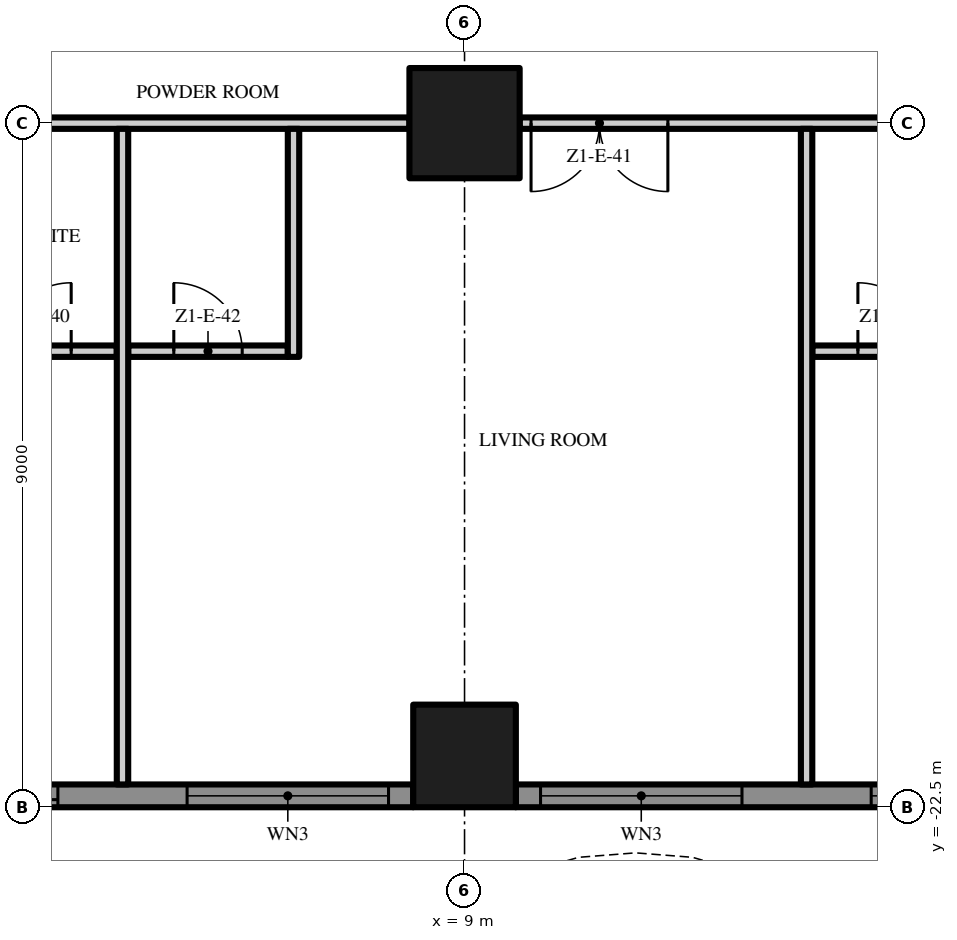
"""IFC4 building model, lengths in metres.
Left out: names, types, materials, properties, quantities, classifications, styles, units other than length and angle.
Written with IfcOpenShell. Run it as: python <this file> out.ifc"""

import sys

from ifc_helpers import new_model, si_unit, direction, frame, frame_2d, origin, origin_2d, place, context, subcontext, project, spatial, polyline, rectangle, outline, extrude, element, fill, save


model = new_model("IFC4")
c1 = context("Model", 3, precision=1e-05, world=origin(), true_north=direction((0.0, 1.0)))
c2 = subcontext(c1, "Body", "Model", "MODEL_VIEW")
j1 = project(units=[si_unit("LENGTHUNIT", "METRE"), si_unit("PLANEANGLEUNIT", "RADIAN")], contexts=[c1])
p1 = place(None, origin())
s1 = spatial("IfcSite", under=j1, at=p1, CompositionType="ELEMENT")
p2 = place(p1, origin())
s2 = spatial("IfcBuilding", under=s1, at=p2, CompositionType="ELEMENT")
p3 = place(p2, frame((0.0, 0.0, 60.6)))
s3 = spatial("IfcBuildingStorey", under=s2, at=p3, CompositionType="ELEMENT", Elevation=60.6)
p4 = place(p3, frame((9.0, -13.5, 0.0), z_axis=(0.0, 0.0, 1.0), x_axis=(1.0, 0.0, 0.0)))
e1 = element("IfcColumn", 1, at=p4, inside=s3, PredefinedType="COLUMN", context=c2, shape_type="SweptSolid", body=[
    extrude(rectangle(XDim=1.45, YDim=1.45, at=origin_2d()), origin(), (0.0, 0.0, 1.0), 3.5),
])
p5 = place(p3, frame((9.0, -21.825, 0.0), z_axis=(0.0, 0.0, 1.0), x_axis=(1.0, 0.0, 0.0)))
e2 = element("IfcColumn", 2, at=p5, inside=s3, PredefinedType="COLUMN", context=c2, shape_type="SweptSolid", body=[
    extrude(rectangle(XDim=1.35, YDim=1.35, at=origin_2d()), origin(), (0.0, 0.0, 1.0), 3.5),
])
p6 = place(p3, frame((8.325, -22.35, 0.0), z_axis=(0.0, 0.0, 1.0), x_axis=(-1.0, 0.0, 0.0)))
e3 = element("IfcWall", 3, at=p6, inside=s3, PredefinedType="SOLIDWALL", context=c2, shape_type="SweptSolid", body=[
    extrude(rectangle(XDim=7.65, YDim=0.3, at=frame_2d((3.825, 0.0))), origin(), (0.0, 0.0, 1.0), 3.5),
])
p7 = place(p6, frame((4.675, 0.0, 0.0)))
e4 = element("IfcOpeningElement", 4, at=p7, cuts=e3, PredefinedType="OPENING", context=c2, shape_type="SweptSolid", body=[
    extrude(rectangle(XDim=2.65, YDim=2.4, at=frame_2d((1.325, 1.2))), frame((0.0, 0.16, 0.0), z_axis=(0.0, -1.0, 0.0), x_axis=(1.0, 0.0, 0.0)), (0.0, 0.0, 1.0), 0.32),
])
p8 = place(p6, frame((0.325, 0.0, 0.45)))
e5 = element("IfcOpeningElement", 5, at=p8, cuts=e3, PredefinedType="OPENING", context=c2, shape_type="SweptSolid", body=[
    extrude(rectangle(XDim=2.65, YDim=2.65, at=frame_2d((1.325, 1.325))), frame((0.0, 0.16, 0.0), z_axis=(0.0, -1.0, 0.0), x_axis=(1.0, 0.0, 0.0)), (0.0, 0.0, 1.0), 0.32),
])
p9 = place(p3, frame((17.325, -22.35, 0.0), z_axis=(0.0, 0.0, 1.0), x_axis=(-1.0, 0.0, 0.0)))
e6 = element("IfcWall", 6, at=p9, inside=s3, PredefinedType="SOLIDWALL", context=c2, shape_type="SweptSolid", body=[
    extrude(rectangle(XDim=7.65, YDim=0.3, at=frame_2d((3.825, 0.0))), origin(), (0.0, 0.0, 1.0), 3.5),
])
p10 = place(p9, frame((4.675, 0.0, 0.45)))
e7 = element("IfcOpeningElement", 7, at=p10, cuts=e6, PredefinedType="OPENING", context=c2, shape_type="SweptSolid", body=[
    extrude(rectangle(XDim=2.65, YDim=2.65, at=frame_2d((1.325, 1.325))), frame((0.0, 0.16, 0.0), z_axis=(0.0, -1.0, 0.0), x_axis=(1.0, 0.0, 0.0)), (0.0, 0.0, 1.0), 0.32),
])
p11 = place(p9, frame((0.325, 0.0, 0.45)))
e8 = element("IfcOpeningElement", 8, at=p11, cuts=e6, PredefinedType="OPENING", context=c2, shape_type="SweptSolid", body=[
    extrude(rectangle(XDim=2.65, YDim=2.65, at=frame_2d((1.325, 1.325))), frame((0.0, 0.16, 0.0), z_axis=(0.0, -1.0, 0.0), x_axis=(1.0, 0.0, 0.0)), (0.0, 0.0, 1.0), 0.32),
])
p12 = place(p3, origin())
e9 = element("IfcWall", 9, at=p12, inside=s3, PredefinedType="USERDEFINED", context=c2, shape_type="SweptSolid", body=[
    extrude(outline(polyline([(-22.5, -24.3), (-21.0, -23.595), (-19.5, -23.159), (-18.75, -23.1), (-18.0, -23.159), (-16.5, -23.595), (-15.0, -24.3), (-13.5, -25.005), (-12.0, -25.441), (-11.25, -25.5), (-10.5, -25.441), (-9.0, -25.005), (-7.5, -24.3), (-6.0, -23.595), (-4.5, -23.159), (-3.75, -23.1), (-3.0, -23.159), (-1.5, -23.595), (0.0, -24.3), (1.5, -25.005), (3.0, -25.441), (3.75, -25.5), (4.5, -25.441), (6.0, -25.005), (7.5, -24.3), (9.0, -23.595), (10.5, -23.159), (11.25, -23.1), (12.0, -23.159), (13.5, -23.595), (15.0, -24.3), (16.5, -25.005), (18.0, -25.441), (18.75, -25.5), (19.5, -25.441), (21.0, -25.005), (22.5, -24.3), (22.394, -24.074), (20.911, -24.771), (19.455, -25.194), (18.75, -25.249), (18.045, -25.194), (16.589, -24.771), (15.106, -24.074), (13.589, -23.36), (12.045, -22.911), (11.25, -22.849), (10.455, -22.911), (8.911, -23.36), (7.394, -24.074), (5.911, -24.771), (4.455, -25.194), (3.75, -25.249), (3.045, -25.194), (1.589, -24.771), (0.106, -24.074), (-1.411, -23.36), (-2.955, -22.911), (-3.75, -22.849), (-4.545, -22.911), (-6.089, -23.36), (-7.606, -24.074), (-9.089, -24.771), (-10.545, -25.194), (-11.25, -25.249), (-11.955, -25.194), (-13.411, -24.771), (-14.894, -24.074), (-16.411, -23.36), (-17.955, -22.911), (-18.75, -22.849), (-19.545, -22.911), (-21.089, -23.36), (-22.606, -24.074), (-22.5, -24.3)])), origin(), (0.0, 0.0, 1.0), 0.9),
])
p13 = place(p3, frame((2.325, -16.5, 0.0), z_axis=(0.0, 0.0, 1.0), x_axis=(1.0, 0.0, 0.0)))
e10 = element("IfcWall", 10, at=p13, inside=s3, PredefinedType="PARTITIONING", context=c2, shape_type="SweptSolid", body=[
    extrude(rectangle(XDim=2.1, YDim=0.15, at=frame_2d((1.05, 0.0))), origin(), (0.0, 0.0, 1.0), 3.5),
])
p14 = place(p13, frame((0.6, 0.0, 0.0)))
e11 = element("IfcOpeningElement", 11, at=p14, cuts=e10, PredefinedType="OPENING", context=c2, shape_type="SweptSolid", body=[
    extrude(rectangle(XDim=0.9, YDim=2.1, at=frame_2d((0.45, 1.05))), frame((0.0, 0.085, 0.0), z_axis=(0.0, -1.0, 0.0), x_axis=(1.0, 0.0, 0.0)), (0.0, 0.0, 1.0), 0.17),
])
p15 = place(p3, frame((4.575, -16.5, 0.0), z_axis=(0.0, 0.0, 1.0), x_axis=(1.0, 0.0, 0.0)))
e12 = element("IfcWall", 12, at=p15, inside=s3, PredefinedType="PARTITIONING", context=c2, shape_type="SweptSolid", body=[
    extrude(rectangle(XDim=2.1, YDim=0.15, at=frame_2d((1.05, 0.0))), origin(), (0.0, 0.0, 1.0), 3.5),
])
p16 = place(p15, frame((0.6, 0.0, 0.0)))
e13 = element("IfcOpeningElement", 13, at=p16, cuts=e12, PredefinedType="OPENING", context=c2, shape_type="SweptSolid", body=[
    extrude(rectangle(XDim=0.9, YDim=2.1, at=frame_2d((0.45, 1.05))), frame((0.0, 0.085, 0.0), z_axis=(0.0, -1.0, 0.0), x_axis=(1.0, 0.0, 0.0)), (0.0, 0.0, 1.0), 0.17),
])
p17 = place(p3, frame((13.575, -16.5, 0.0), z_axis=(0.0, 0.0, 1.0), x_axis=(1.0, 0.0, 0.0)))
e14 = element("IfcWall", 14, at=p17, inside=s3, PredefinedType="PARTITIONING", context=c2, shape_type="SweptSolid", body=[
    extrude(rectangle(XDim=2.1, YDim=0.15, at=frame_2d((1.05, 0.0))), origin(), (0.0, 0.0, 1.0), 3.5),
])
p18 = place(p17, frame((0.6, 0.0, 0.0)))
e15 = element("IfcOpeningElement", 15, at=p18, cuts=e14, PredefinedType="OPENING", context=c2, shape_type="SweptSolid", body=[
    extrude(rectangle(XDim=0.9, YDim=2.1, at=frame_2d((0.45, 1.05))), frame((0.0, 0.085, 0.0), z_axis=(0.0, -1.0, 0.0), x_axis=(1.0, 0.0, 0.0)), (0.0, 0.0, 1.0), 0.17),
])
p19 = place(p3, frame((8.275, -13.5, 0.0), z_axis=(0.0, 0.0, 1.0), x_axis=(-1.0, 0.0, 0.0)))
e16 = element("IfcWall", 16, at=p19, inside=s3, PredefinedType="PARTITIONING", context=c2, shape_type="SweptSolid", body=[
    extrude(rectangle(XDim=7.55, YDim=0.15, at=frame_2d((3.775, 0.0))), origin(), (0.0, 0.0, 1.0), 3.5),
])
p20 = place(p19, frame((6.4, 0.0, 0.0)))
e17 = element("IfcOpeningElement", 17, at=p20, cuts=e16, PredefinedType="OPENING", context=c2, shape_type="SweptSolid", body=[
    extrude(rectangle(XDim=1.0, YDim=2.4, at=frame_2d((0.5, 1.2))), frame((0.0, 0.085, 0.0), z_axis=(0.0, -1.0, 0.0), x_axis=(1.0, 0.0, 0.0)), (0.0, 0.0, 1.0), 0.17),
])
p21 = place(p3, frame((17.275, -13.5, 0.0), z_axis=(0.0, 0.0, 1.0), x_axis=(-1.0, 0.0, 0.0)))
e18 = element("IfcWall", 18, at=p21, inside=s3, PredefinedType="PARTITIONING", context=c2, shape_type="SweptSolid", body=[
    extrude(rectangle(XDim=7.55, YDim=0.15, at=frame_2d((3.775, 0.0))), origin(), (0.0, 0.0, 1.0), 3.5),
])
p22 = place(p21, frame((5.6, 0.0, 0.0)))
e19 = element("IfcOpeningElement", 19, at=p22, cuts=e18, PredefinedType="OPENING", context=c2, shape_type="SweptSolid", body=[
    extrude(rectangle(XDim=1.8, YDim=2.4, at=frame_2d((0.9, 1.2))), frame((0.0, 0.085, 0.0), z_axis=(0.0, -1.0, 0.0), x_axis=(1.0, 0.0, 0.0)), (0.0, 0.0, 1.0), 0.17),
])
p23 = place(p21, frame((0.15, 0.0, 0.0)))
e20 = element("IfcOpeningElement", 20, at=p23, cuts=e18, PredefinedType="OPENING", context=c2, shape_type="SweptSolid", body=[
    extrude(rectangle(XDim=1.0, YDim=2.4, at=frame_2d((0.5, 1.2))), frame((0.0, 0.085, 0.0), z_axis=(0.0, -1.0, 0.0), x_axis=(1.0, 0.0, 0.0)), (0.0, 0.0, 1.0), 0.17),
])
p24 = place(p3, frame((4.5, -22.2, 0.0), z_axis=(0.0, 0.0, 1.0), x_axis=(0.0, 1.0, 0.0)))
e21 = element("IfcWall", 21, at=p24, inside=s3, PredefinedType="PARTITIONING", context=c2, shape_type="SweptSolid", body=[
    extrude(rectangle(XDim=8.625, YDim=0.15, at=frame_2d((4.312, 0.0))), origin(), (0.0, 0.0, 1.0), 3.5),
])
p25 = place(p3, frame((6.75, -16.575, 0.0), z_axis=(0.0, 0.0, 1.0), x_axis=(0.0, 1.0, 0.0)))
e22 = element("IfcWall", 22, at=p25, inside=s3, PredefinedType="PARTITIONING", context=c2, shape_type="SweptSolid", body=[
    extrude(rectangle(XDim=3.0, YDim=0.15, at=frame_2d((1.5, 0.0))), origin(), (0.0, 0.0, 1.0), 3.5),
])
p26 = place(p3, frame((13.5, -22.2, 0.0), z_axis=(0.0, 0.0, 1.0), x_axis=(0.0, 1.0, 0.0)))
e23 = element("IfcWall", 23, at=p26, inside=s3, PredefinedType="PARTITIONING", context=c2, shape_type="SweptSolid", body=[
    extrude(rectangle(XDim=8.625, YDim=0.15, at=frame_2d((4.312, 0.0))), origin(), (0.0, 0.0, 1.0), 3.5),
])
p27 = place(p7, origin())
e24 = element("IfcDoor", 24, at=p27, inside=s3, OperationType="SINGLE_SWING_LEFT", PredefinedType="DOOR", context=c2, shape_type="SweptSolid", body=[
    extrude(rectangle(XDim=2.65, YDim=2.4, at=frame_2d((1.325, 1.2))), frame((0.0, 0.025, 0.0), z_axis=(0.0, -1.0, 0.0), x_axis=(1.0, 0.0, 0.0)), (0.0, 0.0, 1.0), 0.05),
])
fill(e4, e24)
p28 = place(p8, origin())
e25 = element("IfcWindow", 25, at=p28, inside=s3, PartitioningType="SINGLE_PANEL", PredefinedType="WINDOW", context=c2, shape_type="SweptSolid", body=[
    extrude(rectangle(XDim=2.65, YDim=2.65, at=frame_2d((1.325, 1.325))), frame((0.0, 0.03, 0.0), z_axis=(0.0, -1.0, 0.0), x_axis=(1.0, 0.0, 0.0)), (0.0, 0.0, 1.0), 0.06),
])
fill(e5, e25)
p29 = place(p10, origin())
e26 = element("IfcWindow", 26, at=p29, inside=s3, PartitioningType="SINGLE_PANEL", PredefinedType="WINDOW", context=c2, shape_type="SweptSolid", body=[
    extrude(rectangle(XDim=2.65, YDim=2.65, at=frame_2d((1.325, 1.325))), frame((0.0, 0.03, 0.0), z_axis=(0.0, -1.0, 0.0), x_axis=(1.0, 0.0, 0.0)), (0.0, 0.0, 1.0), 0.06),
])
fill(e7, e26)
p30 = place(p11, origin())
e27 = element("IfcWindow", 27, at=p30, inside=s3, PartitioningType="SINGLE_PANEL", PredefinedType="WINDOW", context=c2, shape_type="SweptSolid", body=[
    extrude(rectangle(XDim=2.65, YDim=2.65, at=frame_2d((1.325, 1.325))), frame((0.0, 0.03, 0.0), z_axis=(0.0, -1.0, 0.0), x_axis=(1.0, 0.0, 0.0)), (0.0, 0.0, 1.0), 0.06),
])
fill(e8, e27)
p31 = place(p14, origin())
e28 = element("IfcDoor", 28, at=p31, inside=s3, OperationType="SINGLE_SWING_RIGHT", PredefinedType="DOOR", context=c2, shape_type="SweptSolid", body=[
    extrude(rectangle(XDim=0.9, YDim=2.1, at=frame_2d((0.45, 1.05))), frame((0.0, 0.025, 0.0), z_axis=(0.0, -1.0, 0.0), x_axis=(1.0, 0.0, 0.0)), (0.0, 0.0, 1.0), 0.05),
])
fill(e11, e28)
p32 = place(p22, origin())
e29 = element("IfcDoor", 29, at=p32, inside=s3, OperationType="DOUBLE_DOOR_SINGLE_SWING", PredefinedType="DOOR", context=c2, shape_type="SweptSolid", body=[
    extrude(rectangle(XDim=1.8, YDim=2.4, at=frame_2d((0.9, 1.2))), frame((0.0, 0.025, 0.0), z_axis=(0.0, -1.0, 0.0), x_axis=(1.0, 0.0, 0.0)), (0.0, 0.0, 1.0), 0.05),
])
fill(e19, e29)
p33 = place(p16, origin())
e30 = element("IfcDoor", 30, at=p33, inside=s3, OperationType="SINGLE_SWING_LEFT", PredefinedType="DOOR", context=c2, shape_type="SweptSolid", body=[
    extrude(rectangle(XDim=0.9, YDim=2.1, at=frame_2d((0.45, 1.05))), frame((0.0, 0.025, 0.0), z_axis=(0.0, -1.0, 0.0), x_axis=(1.0, 0.0, 0.0)), (0.0, 0.0, 1.0), 0.05),
])
fill(e13, e30)
p34 = place(p18, origin())
e31 = element("IfcDoor", 31, at=p34, inside=s3, OperationType="SINGLE_SWING_LEFT", PredefinedType="DOOR", context=c2, shape_type="SweptSolid", body=[
    extrude(rectangle(XDim=0.9, YDim=2.1, at=frame_2d((0.45, 1.05))), frame((0.0, 0.025, 0.0), z_axis=(0.0, -1.0, 0.0), x_axis=(1.0, 0.0, 0.0)), (0.0, 0.0, 1.0), 0.05),
])
fill(e15, e31)
save(model, sys.argv[1])
